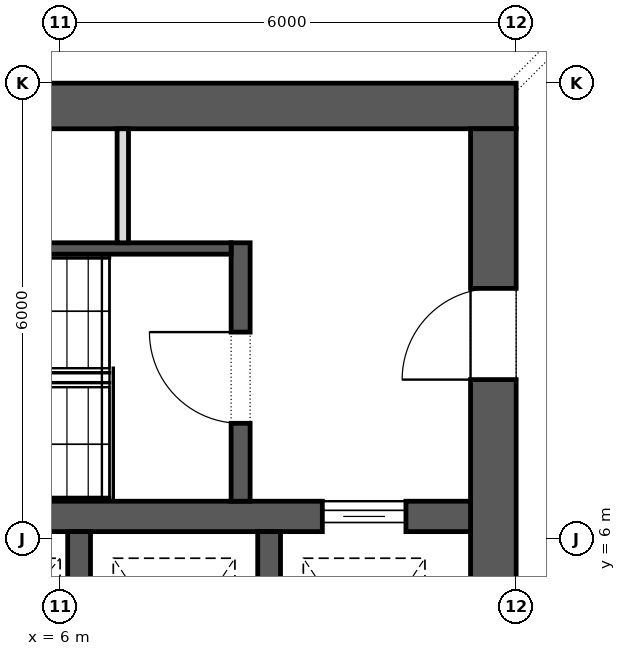
"""IFC4 building model, lengths in metres.
Left out: names, types, materials, properties, quantities, classifications, styles, units other than length and angle.
Written with IfcOpenShell. Run it as: python <this file> out.ifc"""

import sys

from ifc_helpers import new_model, si_unit, direction, frame, frame_2d, origin, place, context, subcontext, project, spatial, rectangle, extrude, element, fill, save


model = new_model("IFC4")
c1 = context("Model", 3, precision=1e-05, world=origin(), true_north=direction((0.0, 1.0)))
c2 = subcontext(c1, "Body", "Model", "MODEL_VIEW")
j1 = project(units=[si_unit("LENGTHUNIT", "METRE"), si_unit("PLANEANGLEUNIT", "RADIAN")], contexts=[c1])
p1 = place(None, origin())
s1 = spatial("IfcSite", under=j1, at=p1, CompositionType="ELEMENT")
p2 = place(p1, origin())
s2 = spatial("IfcBuilding", under=s1, at=p2, CompositionType="ELEMENT")
p3 = place(p2, frame((0.0, 0.0, 7.0)))
s3 = spatial("IfcBuildingStorey", under=s2, at=p3, CompositionType="ELEMENT", Elevation=7.0)
p4 = place(p3, frame((-12.0, 11.7, 0.0), z_axis=(0.0, 0.0, 1.0), x_axis=(1.0, 0.0, 0.0)))
e1 = element("IfcWall", 1, at=p4, inside=s3, PredefinedType="SHEAR", context=c2, shape_type="SweptSolid", body=[
    extrude(rectangle(XDim=24.0, YDim=0.6, at=frame_2d((12.0, 0.0))), origin(), (0.0, 0.0, 1.0), 5.5),
])
p5 = place(p4, frame((9.025, 0.0, 0.0)))
e2 = element("IfcOpeningElement", 2, at=p5, cuts=e1, PredefinedType="OPENING", context=c2, shape_type="SweptSolid", body=[
    extrude(rectangle(XDim=0.8, YDim=2.1, at=frame_2d((0.4, 1.05))), frame((0.0, 0.312, 0.0), z_axis=(0.0, -1.0, 0.0), x_axis=(1.0, 0.0, 0.0)), (0.0, 0.0, 1.0), 0.624),
])
p6 = place(p4, frame((10.625, 0.0, 0.0)))
e3 = element("IfcOpeningElement", 3, at=p6, cuts=e1, PredefinedType="OPENING", context=c2, shape_type="SweptSolid", body=[
    extrude(rectangle(XDim=0.9, YDim=2.1, at=frame_2d((0.45, 1.05))), frame((0.0, 0.312, 0.0), z_axis=(0.0, -1.0, 0.0), x_axis=(1.0, 0.0, 0.0)), (0.0, 0.0, 1.0), 0.624),
])
p7 = place(p4, frame((4.2, 0.0, 0.0)))
e4 = element("IfcOpeningElement", 4, at=p7, cuts=e1, PredefinedType="OPENING", context=c2, shape_type="SweptSolid", body=[
    extrude(rectangle(XDim=0.8, YDim=2.1, at=frame_2d((0.4, 1.05))), frame((0.0, 0.312, 0.0), z_axis=(0.0, -1.0, 0.0), x_axis=(1.0, 0.0, 0.0)), (0.0, 0.0, 1.0), 0.624),
])
p8 = place(p4, frame((6.2, 0.0, 0.0)))
e5 = element("IfcOpeningElement", 5, at=p8, cuts=e1, PredefinedType="OPENING", context=c2, shape_type="SweptSolid", body=[
    extrude(rectangle(XDim=0.8, YDim=2.1, at=frame_2d((0.4, 1.05))), frame((0.0, 0.312, 0.0), z_axis=(0.0, -1.0, 0.0), x_axis=(1.0, 0.0, 0.0)), (0.0, 0.0, 1.0), 0.624),
])
p9 = place(p4, frame((7.7, 0.0, 0.0)))
e6 = element("IfcOpeningElement", 6, at=p9, cuts=e1, PredefinedType="OPENING", context=c2, shape_type="SweptSolid", body=[
    extrude(rectangle(XDim=0.8, YDim=2.1, at=frame_2d((0.4, 1.05))), frame((0.0, 0.312, 0.0), z_axis=(0.0, -1.0, 0.0), x_axis=(1.0, 0.0, 0.0)), (0.0, 0.0, 1.0), 0.624),
])
p10 = place(p4, frame((15.85, 0.0, 0.0)))
e7 = element("IfcOpeningElement", 7, at=p10, cuts=e1, PredefinedType="OPENING", context=c2, shape_type="SweptSolid", body=[
    extrude(rectangle(XDim=0.8, YDim=2.1, at=frame_2d((0.4, 1.05))), frame((0.0, 0.312, 0.0), z_axis=(0.0, -1.0, 0.0), x_axis=(1.0, 0.0, 0.0)), (0.0, 0.0, 1.0), 0.624),
])
p11 = place(p3, frame((11.7, -11.4, 0.0), z_axis=(0.0, 0.0, 1.0), x_axis=(0.0, 1.0, 0.0)))
e8 = element("IfcWall", 8, at=p11, inside=s3, PredefinedType="SHEAR", context=c2, shape_type="SweptSolid", body=[
    extrude(rectangle(XDim=22.8, YDim=0.6, at=frame_2d((11.4, 0.0))), origin(), (0.0, 0.0, 1.0), 5.5),
])
p12 = place(p11, frame((10.2, 0.0, 0.0)))
e9 = element("IfcOpeningElement", 9, at=p12, cuts=e8, PredefinedType="OPENING", context=c2, shape_type="SweptSolid", body=[
    extrude(rectangle(XDim=2.4, YDim=2.1, at=frame_2d((1.2, 1.05))), frame((0.0, 0.312, 0.0), z_axis=(0.0, -1.0, 0.0), x_axis=(1.0, 0.0, 0.0)), (0.0, 0.0, 1.0), 0.624),
])
p13 = place(p11, frame((19.5, 0.0, 0.0)))
e10 = element("IfcOpeningElement", 10, at=p13, cuts=e8, PredefinedType="OPENING", context=c2, shape_type="SweptSolid", body=[
    extrude(rectangle(XDim=1.2, YDim=2.1, at=frame_2d((0.6, 1.05))), frame((0.0, 0.312, 0.0), z_axis=(0.0, -1.0, 0.0), x_axis=(1.0, 0.0, 0.0)), (0.0, 0.0, 1.0), 0.624),
])
p14 = place(p11, frame((2.1, 0.0, 0.0)))
e11 = element("IfcOpeningElement", 11, at=p14, cuts=e8, PredefinedType="OPENING", context=c2, shape_type="SweptSolid", body=[
    extrude(rectangle(XDim=1.2, YDim=2.1, at=frame_2d((0.6, 1.05))), frame((0.0, 0.312, 0.0), z_axis=(0.0, -1.0, 0.0), x_axis=(1.0, 0.0, 0.0)), (0.0, 0.0, 1.0), 0.624),
])
p15 = place(p3, frame((-11.4, 6.3, 0.0), z_axis=(0.0, 0.0, 1.0), x_axis=(1.0, 0.0, 0.0)))
e12 = element("IfcWall", 12, at=p15, inside=s3, PredefinedType="SHEAR", context=c2, shape_type="SweptSolid", body=[
    extrude(rectangle(XDim=22.8, YDim=0.4, at=frame_2d((11.4, 0.0))), origin(), (0.0, 0.0, 1.0), 5.5),
])
p16 = place(p15, frame((20.85, 0.0, 0.0)))
e13 = element("IfcOpeningElement", 13, at=p16, cuts=e12, PredefinedType="OPENING", context=c2, shape_type="SweptSolid", body=[
    extrude(rectangle(XDim=1.1, YDim=2.1, at=frame_2d((0.55, 1.05))), frame((0.0, 0.212, 0.0), z_axis=(0.0, -1.0, 0.0), x_axis=(1.0, 0.0, 0.0)), (0.0, 0.0, 1.0), 0.424),
])
for number, where, z_axis, x_axis in (
    (14, (6.25, 3.2, 0.0), (0.0, 0.0, 1.0), (0.0, 1.0, 0.0)),
    (15, (8.75, 3.2, 0.0), (0.0, 0.0, 1.0), (0.0, 1.0, 0.0)),
):
    element("IfcWall", number, at=place(p3, frame(where, z_axis=z_axis, x_axis=x_axis)), inside=s3, PredefinedType="SHEAR", context=c2, shape_type="SweptSolid", body=[
        extrude(rectangle(XDim=2.9, YDim=0.3, at=frame_2d((1.45, 0.0))), origin(), (0.0, 0.0, 1.0), 5.5),
    ])
p17 = place(p3, frame((8.375, 6.5, 0.0), z_axis=(0.0, 0.0, 1.0), x_axis=(0.0, 1.0, 0.0)))
e16 = element("IfcWall", 16, at=p17, inside=s3, PredefinedType="SHEAR", context=c2, shape_type="SweptSolid", body=[
    extrude(rectangle(XDim=3.4, YDim=0.25, at=frame_2d((1.7, 0.0))), origin(), (0.0, 0.0, 1.0), 5.15),
])
p18 = place(p17, frame((1.025, 0.0, 0.0)))
e17 = element("IfcOpeningElement", 17, at=p18, cuts=e16, PredefinedType="OPENING", context=c2, shape_type="SweptSolid", body=[
    extrude(rectangle(XDim=1.2, YDim=2.1, at=frame_2d((0.6, 1.05))), frame((0.0, 0.137, 0.0), z_axis=(0.0, -1.0, 0.0), x_axis=(1.0, 0.0, 0.0)), (0.0, 0.0, 1.0), 0.274),
])
p19 = place(p3, frame((0.25, 9.825, 0.0), z_axis=(0.0, 0.0, 1.0), x_axis=(1.0, 0.0, 0.0)))
e18 = element("IfcWall", 18, at=p19, inside=s3, PredefinedType="SHEAR", context=c2, shape_type="SweptSolid", body=[
    extrude(rectangle(XDim=8.0, YDim=0.15, at=frame_2d((4.0, 0.0))), origin(), (0.0, 0.0, 1.0), 5.15),
])
p20 = place(p3, frame((6.825, 9.9, 0.0), z_axis=(0.0, 0.0, 1.0), x_axis=(0.0, 1.0, 0.0)))
e19 = element("IfcWall", 19, at=p20, inside=s3, PredefinedType="PARTITIONING", context=c2, shape_type="SweptSolid", body=[
    extrude(rectangle(XDim=1.5, YDim=0.15, at=frame_2d((0.75, 0.0))), origin(), (0.0, 0.0, 1.0), 5.15),
])
p21 = place(p16, origin())
e20 = element("IfcDoor", 20, at=p21, inside=s3, OperationType="SLIDING_TO_LEFT", PredefinedType="DOOR", context=c2, shape_type="SweptSolid", body=[
    extrude(rectangle(XDim=1.1, YDim=2.1, at=frame_2d((0.55, 1.05))), frame((0.0, 0.025, 0.0), z_axis=(0.0, -1.0, 0.0), x_axis=(1.0, 0.0, 0.0)), (0.0, 0.0, 1.0), 0.05),
])
fill(e13, e20)
p22 = place(p18, origin())
e21 = element("IfcDoor", 21, at=p22, inside=s3, OperationType="SINGLE_SWING_LEFT", PredefinedType="DOOR", context=c2, shape_type="SweptSolid", body=[
    extrude(rectangle(XDim=1.2, YDim=2.1, at=frame_2d((0.6, 1.05))), frame((0.0, 0.025, 0.0), z_axis=(0.0, -1.0, 0.0), x_axis=(1.0, 0.0, 0.0)), (0.0, 0.0, 1.0), 0.05),
])
fill(e17, e21)
p23 = place(p13, origin())
e22 = element("IfcDoor", 22, at=p23, inside=s3, OperationType="SINGLE_SWING_RIGHT", PredefinedType="DOOR", context=c2, shape_type="SweptSolid", body=[
    extrude(rectangle(XDim=1.2, YDim=2.1, at=frame_2d((0.6, 1.05))), frame((0.0, 0.025, 0.0), z_axis=(0.0, -1.0, 0.0), x_axis=(1.0, 0.0, 0.0)), (0.0, 0.0, 1.0), 0.05),
])
fill(e10, e22)
save(model, sys.argv[1])
